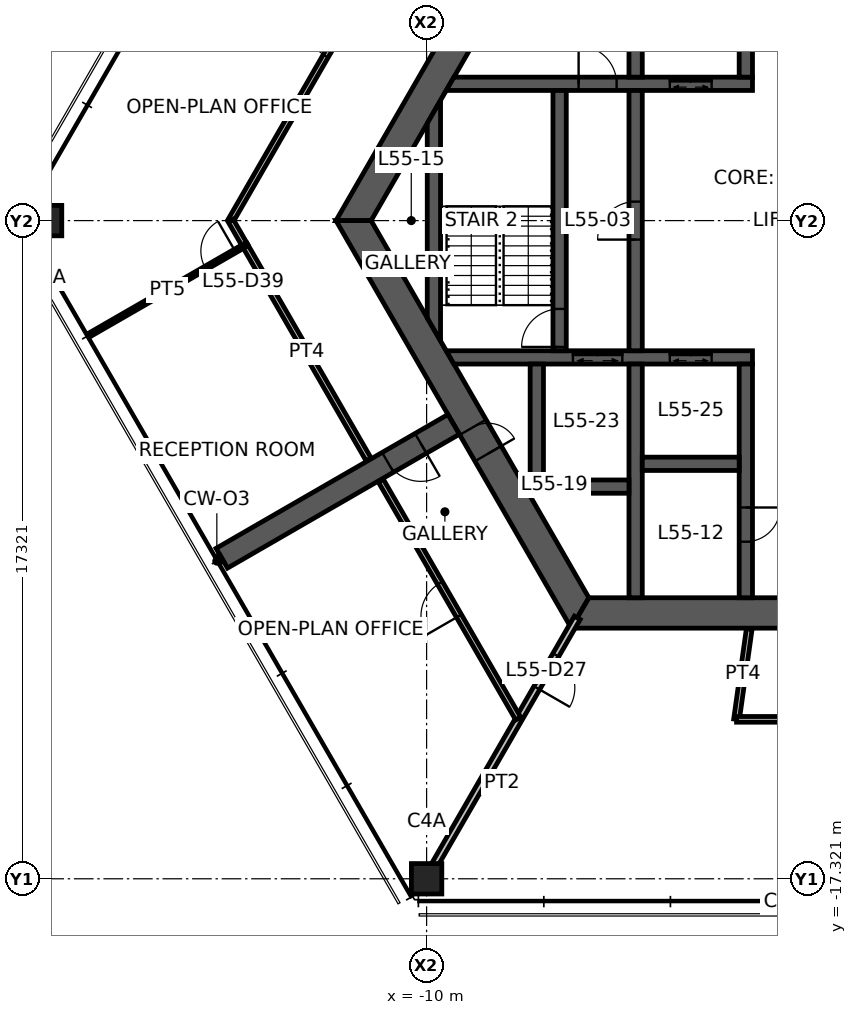
"""IFC4 building model, lengths in metres.
Left out: names, types, materials, properties, quantities, classifications, styles, units other than length and angle.
Written with IfcOpenShell. Run it as: python <this file> out.ifc"""

import sys

from ifc_helpers import new_model, si_unit, direction, frame, frame_2d, origin, origin_2d, place, context, subcontext, project, spatial, polyline, rectangle, hollow_rectangle, outline, extrude, element, fill, save


model = new_model("IFC4")
c1 = context("Model", 3, precision=1e-05, world=origin(), true_north=direction((0.0, 1.0)))
c2 = subcontext(c1, "Body", "Model", "MODEL_VIEW")
j1 = project(units=[si_unit("LENGTHUNIT", "METRE"), si_unit("PLANEANGLEUNIT", "RADIAN")], contexts=[c1])
p1 = place(None, origin())
s1 = spatial("IfcSite", under=j1, at=p1, CompositionType="ELEMENT")
p2 = place(p1, origin())
s2 = spatial("IfcBuilding", under=s1, at=p2, CompositionType="ELEMENT")
p3 = place(p2, frame((0.0, 0.0, 220.6)))
s3 = spatial("IfcBuildingStorey", under=s2, at=p3, CompositionType="ELEMENT", Elevation=220.6)
for number, where, z_axis, x_axis in (
    (1, (-20.0, 0.0, 0.0), (0.0, 0.0, 1.0), (1.0, 0.0, 0.0)),
    (2, (-10.0, -17.321, 0.0), (0.0, 0.0, 1.0), (1.0, 0.0, 0.0)),
):
    element("IfcColumn", number, at=place(p3, frame(where, z_axis=z_axis, x_axis=x_axis)), inside=s3, PredefinedType="COLUMN", context=c2, shape_type="SweptSolid", body=[
        extrude(hollow_rectangle(XDim=0.8, YDim=0.8, WallThickness=0.04, at=origin_2d()), origin(), (0.0, 0.0, 1.0), 3.9),
    ])
p4 = place(p3, frame((-5.961, 10.325, 0.0), z_axis=(0.0, 0.0, 1.0), x_axis=(-0.500004296715, -0.866022923061, 0.0)))
e3 = element("IfcWall", 3, at=p4, inside=s3, PredefinedType="SHEAR", context=c2, shape_type="SweptSolid", body=[
    extrude(outline(polyline([(-0.231, -0.4), (4.494, -0.4), (5.494, -0.4), (12.153, -0.4), (11.691, 0.4), (5.494, 0.4), (4.494, 0.4), (0.231, 0.4), (-0.231, -0.4)])), origin(), (0.0, 0.0, 1.0), 3.9),
])
p5 = place(p4, frame((4.494, 0.0, 0.0)))
e4 = element("IfcOpeningElement", 4, at=p5, cuts=e3, PredefinedType="OPENING", context=c2, shape_type="SweptSolid", body=[
    extrude(rectangle(XDim=1.0, YDim=2.1, at=frame_2d((0.5, 1.05))), frame((0.0, 0.41, 0.0), z_axis=(0.0, -1.0, 0.0), x_axis=(1.0, 0.0, 0.0)), (0.0, 0.0, 1.0), 0.82),
])
p6 = place(p3, frame((-11.922, 0.0, 0.0), z_axis=(0.0, 0.0, 1.0), x_axis=(0.500004296715, -0.866022923061, 0.0)))
e5 = element("IfcWall", 5, at=p6, inside=s3, PredefinedType="SHEAR", context=c2, shape_type="SweptSolid", body=[
    extrude(outline(polyline([(-0.231, -0.4), (6.281, -0.4), (7.081, -0.4), (12.153, -0.4), (11.691, 0.4), (7.081, 0.4), (6.281, 0.4), (0.231, 0.4), (-0.231, -0.4)])), origin(), (0.0, 0.0, 1.0), 3.9),
])
p7 = place(p6, frame((6.281, 0.0, 0.0)))
e6 = element("IfcOpeningElement", 6, at=p7, cuts=e5, PredefinedType="OPENING", context=c2, shape_type="SweptSolid", body=[
    extrude(rectangle(XDim=0.8, YDim=2.1, at=frame_2d((0.4, 1.05))), frame((0.0, 0.41, 0.0), z_axis=(0.0, -1.0, 0.0), x_axis=(1.0, 0.0, 0.0)), (0.0, 0.0, 1.0), 0.82),
])
p8 = place(p3, frame((-5.961, -10.325, 0.0), z_axis=(0.0, 0.0, 1.0), x_axis=(1.0, 0.0, 0.0)))
e7 = element("IfcWall", 7, at=p8, inside=s3, PredefinedType="SHEAR", context=c2, shape_type="SweptSolid", body=[
    extrude(outline(polyline([(-0.231, -0.4), (5.461, -0.4), (6.461, -0.4), (12.153, -0.4), (11.691, 0.4), (6.461, 0.4), (5.461, 0.4), (0.231, 0.4), (-0.231, -0.4)])), origin(), (0.0, 0.0, 1.0), 3.9),
])
p9 = place(p8, frame((5.461, 0.0, 0.0)))
e8 = element("IfcOpeningElement", 8, at=p9, cuts=e7, PredefinedType="OPENING", context=c2, shape_type="SweptSolid", body=[
    extrude(rectangle(XDim=1.0, YDim=2.1, at=frame_2d((0.5, 1.05))), frame((0.0, 0.41, 0.0), z_axis=(0.0, -1.0, 0.0), x_axis=(1.0, 0.0, 0.0)), (0.0, 0.0, 1.0), 0.82),
])
p10 = place(p3, frame((-9.288, -5.363, 0.0), z_axis=(0.0, 0.0, 1.0), x_axis=(-0.866027473358, -0.499996415376, 0.0)))
e9 = element("IfcWall", 9, at=p10, inside=s3, PredefinedType="SHEAR", context=c2, shape_type="SweptSolid", body=[
    extrude(rectangle(XDim=7.045, YDim=0.6, at=frame_2d((3.523, 0.0))), origin(), (0.0, 0.0, 1.0), 3.9),
])
p11 = place(p10, frame((1.0, 0.0, 0.0)))
e10 = element("IfcOpeningElement", 10, at=p11, cuts=e9, PredefinedType="OPENING", context=c2, shape_type="SweptSolid", body=[
    extrude(rectangle(XDim=1.0, YDim=2.1, at=frame_2d((0.5, 1.05))), frame((0.0, 0.31, 0.0), z_axis=(0.0, -1.0, 0.0), x_axis=(1.0, 0.0, 0.0)), (0.0, 0.0, 1.0), 0.62),
])
p12 = place(p3, frame((-9.382, 3.6, 0.0), z_axis=(0.0, 0.0, 1.0), x_axis=(1.0, 0.0, 0.0)))
e11 = element("IfcWall", 11, at=p12, inside=s3, PredefinedType="SHEAR", context=c2, shape_type="SweptSolid", body=[
    extrude(outline(polyline([(-0.101, -0.175), (3.382, -0.175), (4.382, -0.175), (5.782, -0.175), (6.882, -0.175), (7.957, -0.175), (7.957, 0.175), (6.882, 0.175), (5.782, 0.175), (4.382, 0.175), (3.382, 0.175), (0.101, 0.175), (-0.101, -0.175)])), origin(), (0.0, 0.0, 1.0), 3.9),
])
p13 = place(p12, frame((3.382, 0.0, 0.0)))
e12 = element("IfcOpeningElement", 12, at=p13, cuts=e11, PredefinedType="OPENING", context=c2, shape_type="SweptSolid", body=[
    extrude(rectangle(XDim=1.0, YDim=2.1, at=frame_2d((0.5, 1.05))), frame((0.0, 0.185, 0.0), z_axis=(0.0, -1.0, 0.0), x_axis=(1.0, 0.0, 0.0)), (0.0, 0.0, 1.0), 0.37),
])
p14 = place(p12, frame((5.782, 0.0, 0.0)))
e13 = element("IfcOpeningElement", 13, at=p14, cuts=e11, PredefinedType="OPENING", context=c2, shape_type="SweptSolid", body=[
    extrude(rectangle(XDim=1.1, YDim=2.1, at=frame_2d((0.55, 1.05))), frame((0.0, 0.185, 0.0), z_axis=(0.0, -1.0, 0.0), x_axis=(1.0, 0.0, 0.0)), (0.0, 0.0, 1.0), 0.37),
])
p15 = place(p3, frame((-9.382, -3.6, 0.0), z_axis=(0.0, 0.0, 1.0), x_axis=(1.0, 0.0, 0.0)))
e14 = element("IfcWall", 14, at=p15, inside=s3, PredefinedType="SHEAR", context=c2, shape_type="SweptSolid", body=[
    extrude(outline(polyline([(0.101, -0.175), (3.232, -0.175), (4.532, -0.175), (5.782, -0.175), (6.882, -0.175), (7.957, -0.175), (7.957, 0.175), (6.882, 0.175), (5.782, 0.175), (4.532, 0.175), (3.232, 0.175), (-0.101, 0.175), (0.101, -0.175)])), origin(), (0.0, 0.0, 1.0), 3.9),
])
p16 = place(p15, frame((5.782, 0.0, 0.0)))
e15 = element("IfcOpeningElement", 15, at=p16, cuts=e14, PredefinedType="OPENING", context=c2, shape_type="SweptSolid", body=[
    extrude(rectangle(XDim=1.1, YDim=2.1, at=frame_2d((0.55, 1.05))), frame((0.0, 0.185, 0.0), z_axis=(0.0, -1.0, 0.0), x_axis=(1.0, 0.0, 0.0)), (0.0, 0.0, 1.0), 0.37),
])
p17 = place(p15, frame((3.232, 0.0, 0.0)))
e16 = element("IfcOpeningElement", 16, at=p17, cuts=e14, PredefinedType="OPENING", context=c2, shape_type="SweptSolid", body=[
    extrude(rectangle(XDim=1.3, YDim=2.1, at=frame_2d((0.65, 1.05))), frame((0.0, 0.185, 0.0), z_axis=(0.0, -1.0, 0.0), x_axis=(1.0, 0.0, 0.0)), (0.0, 0.0, 1.0), 0.37),
])
p18 = place(p3, frame((-1.6, 3.775, 0.0), z_axis=(0.0, 0.0, 1.0), x_axis=(0.0, 1.0, 0.0)))
e17 = element("IfcWall", 17, at=p18, inside=s3, PredefinedType="SHEAR", context=c2, shape_type="SweptSolid", body=[
    extrude(rectangle(XDim=6.15, YDim=0.35, at=frame_2d((3.075, 0.0))), origin(), (0.0, 0.0, 1.0), 3.9),
])
p19 = place(p18, frame((3.775, 0.0, 0.0)))
e18 = element("IfcOpeningElement", 18, at=p19, cuts=e17, PredefinedType="OPENING", context=c2, shape_type="SweptSolid", body=[
    extrude(rectangle(XDim=0.9, YDim=2.1, at=frame_2d((0.45, 1.05))), frame((0.0, 0.185, 0.0), z_axis=(0.0, -1.0, 0.0), x_axis=(1.0, 0.0, 0.0)), (0.0, 0.0, 1.0), 0.37),
])
p20 = place(p3, frame((-1.6, -3.775, 0.0), z_axis=(0.0, 0.0, 1.0), x_axis=(0.0, -1.0, 0.0)))
e19 = element("IfcWall", 19, at=p20, inside=s3, PredefinedType="SHEAR", context=c2, shape_type="SweptSolid", body=[
    extrude(rectangle(XDim=6.15, YDim=0.35, at=frame_2d((3.075, 0.0))), origin(), (0.0, 0.0, 1.0), 3.9),
])
p21 = place(p20, frame((3.775, 0.0, 0.0)))
e20 = element("IfcOpeningElement", 20, at=p21, cuts=e19, PredefinedType="OPENING", context=c2, shape_type="SweptSolid", body=[
    extrude(rectangle(XDim=0.9, YDim=2.1, at=frame_2d((0.45, 1.05))), frame((0.0, 0.185, 0.0), z_axis=(0.0, -1.0, 0.0), x_axis=(1.0, 0.0, 0.0)), (0.0, 0.0, 1.0), 0.37),
])
p22 = place(p3, frame((-4.5, -3.425, 0.0), z_axis=(0.0, 0.0, 1.0), x_axis=(0.0, 1.0, 0.0)))
e21 = element("IfcWall", 21, at=p22, inside=s3, PredefinedType="SHEAR", context=c2, shape_type="SweptSolid", body=[
    extrude(rectangle(XDim=6.85, YDim=0.35, at=frame_2d((3.425, 0.0))), origin(), (0.0, 0.0, 1.0), 3.9),
])
p23 = place(p22, frame((2.925, 0.0, 0.0)))
e22 = element("IfcOpeningElement", 22, at=p23, cuts=e21, PredefinedType="OPENING", context=c2, shape_type="SweptSolid", body=[
    extrude(rectangle(XDim=1.0, YDim=2.1, at=frame_2d((0.5, 1.05))), frame((0.0, 0.185, 0.0), z_axis=(0.0, -1.0, 0.0), x_axis=(1.0, 0.0, 0.0)), (0.0, 0.0, 1.0), 0.37),
])
p24 = place(p3, frame((-6.5, -3.425, 0.0), z_axis=(0.0, 0.0, 1.0), x_axis=(0.0, 1.0, 0.0)))
e23 = element("IfcWall", 23, at=p24, inside=s3, PredefinedType="SHEAR", context=c2, shape_type="SweptSolid", body=[
    extrude(rectangle(XDim=6.85, YDim=0.35, at=frame_2d((3.425, 0.0))), origin(), (0.0, 0.0, 1.0), 3.9),
])
p25 = place(p24, frame((0.1, 0.0, 0.0)))
e24 = element("IfcOpeningElement", 24, at=p25, cuts=e23, PredefinedType="OPENING", context=c2, shape_type="SweptSolid", body=[
    extrude(rectangle(XDim=1.0, YDim=2.1, at=frame_2d((0.5, 1.05))), frame((0.0, 0.185, 0.0), z_axis=(0.0, -1.0, 0.0), x_axis=(1.0, 0.0, 0.0)), (0.0, 0.0, 1.0), 0.37),
])
for number, where, z_axis, x_axis in (
    (25, (-4.5, 3.775, 0.0), (0.0, 0.0, 1.0), (0.0, 1.0, 0.0)),
    (26, (-4.5, -3.775, 0.0), (0.0, 0.0, 1.0), (0.0, -1.0, 0.0)),
):
    element("IfcWall", number, at=place(p3, frame(where, z_axis=z_axis, x_axis=x_axis)), inside=s3, PredefinedType="SHEAR", context=c2, shape_type="SweptSolid", body=[
        extrude(rectangle(XDim=6.15, YDim=0.35, at=frame_2d((3.075, 0.0))), origin(), (0.0, 0.0, 1.0), 3.9),
    ])
p26 = place(p3, frame((-4.325, -6.4, 0.0), z_axis=(0.0, 0.0, 1.0), x_axis=(1.0, 0.0, 0.0)))
e27 = element("IfcWall", 27, at=p26, inside=s3, PredefinedType="SHEAR", context=c2, shape_type="SweptSolid", body=[
    extrude(rectangle(XDim=2.55, YDim=0.35, at=frame_2d((1.275, 0.0))), origin(), (0.0, 0.0, 1.0), 3.9),
])
p27 = place(p3, frame((-7.275, -7.0, 0.0), z_axis=(0.0, 0.0, 1.0), x_axis=(1.0, 0.0, 0.0)))
e28 = element("IfcWall", 28, at=p27, inside=s3, PredefinedType="SHEAR", context=c2, shape_type="SweptSolid", body=[
    extrude(rectangle(XDim=2.6, YDim=0.35, at=frame_2d((1.3, 0.0))), origin(), (0.0, 0.0, 1.0), 3.9),
])
p28 = place(p3, frame((-7.1, -3.775, 0.0), z_axis=(0.0, 0.0, 1.0), x_axis=(0.0, -1.0, 0.0)))
e29 = element("IfcWall", 29, at=p28, inside=s3, PredefinedType="SHEAR", context=c2, shape_type="SweptSolid", body=[
    extrude(rectangle(XDim=3.05, YDim=0.35, at=frame_2d((1.525, 0.0))), origin(), (0.0, 0.0, 1.0), 3.9),
])
p29 = place(p3, frame((-9.808, -2.862, 0.0), z_axis=(0.0, 0.0, 1.0), x_axis=(0.0, 1.0, 0.0)))
e30 = element("IfcWall", 30, at=p29, inside=s3, PredefinedType="SHEAR", context=c2, shape_type="SweptSolid", body=[
    extrude(outline(polyline([(-0.303, -0.175), (6.028, -0.175), (5.421, 0.175), (0.303, 0.175), (-0.303, -0.175)])), origin(), (0.0, 0.0, 1.0), 3.9),
])
p30 = place(p3, frame((-6.035, -10.453, 0.0), z_axis=(0.0, 0.0, 1.0), x_axis=(-0.499989830942, -0.866031274813, 0.0)))
e31 = element("IfcWall", 31, at=p30, inside=s3, PredefinedType="PARTITIONING", context=c2, shape_type="SweptSolid", body=[
    extrude(rectangle(XDim=7.93, YDim=0.175, at=frame_2d((3.965, 0.0))), origin(), (0.0, 0.0, 1.0), 3.05),
])
p31 = place(p30, frame((1.13, 0.0, 0.0)))
e32 = element("IfcOpeningElement", 32, at=p31, cuts=e31, PredefinedType="OPENING", context=c2, shape_type="SweptSolid", body=[
    extrude(rectangle(XDim=1.0, YDim=2.1, at=frame_2d((0.5, 1.05))), frame((0.0, 0.098, 0.0), z_axis=(0.0, -1.0, 0.0), x_axis=(1.0, 0.0, 0.0)), (0.0, 0.0, 1.0), 0.195),
])
p32 = place(p3, frame((-11.527, -6.285, 0.0), z_axis=(0.0, 0.0, 1.0), x_axis=(-0.500003537243, 0.866023361547, 0.0)))
e33 = element("IfcWall", 33, at=p32, inside=s3, PredefinedType="PARTITIONING", context=c2, shape_type="SweptSolid", body=[
    extrude(rectangle(XDim=6.516, YDim=0.15, at=frame_2d((3.258, 0.0))), origin(), (0.0, 0.0, 1.0), 2.95),
])
p33 = place(p3, frame((-15.156, 0.0, 0.0), z_axis=(0.0, 0.0, 1.0), x_axis=(0.500006847747, 0.8660214502, 0.0)))
e34 = element("IfcWall", 34, at=p33, inside=s3, PredefinedType="PARTITIONING", context=c2, shape_type="SweptSolid", body=[
    extrude(rectangle(XDim=10.998, YDim=0.15, at=frame_2d((5.499, 0.0))), origin(), (0.0, 0.0, 1.0), 2.95),
])
p34 = place(p33, frame((4.999, 0.0, 0.0)))
e35 = element("IfcOpeningElement", 35, at=p34, cuts=e34, PredefinedType="OPENING", context=c2, shape_type="SweptSolid", body=[
    extrude(rectangle(XDim=1.0, YDim=2.1, at=frame_2d((0.5, 1.05))), frame((0.0, 0.085, 0.0), z_axis=(0.0, -1.0, 0.0), x_axis=(1.0, 0.0, 0.0)), (0.0, 0.0, 1.0), 0.17),
])
p35 = place(p3, frame((-14.78, -0.651, 0.0), z_axis=(0.0, 0.0, 1.0), x_axis=(-0.500088105676, 0.865974529972, 0.0)))
e36 = element("IfcWall", 36, at=p35, inside=s3, PredefinedType="PARTITIONING", context=c2, shape_type="SweptSolid", body=[
    extrude(rectangle(XDim=0.751, YDim=0.15, at=frame_2d((0.375, 0.0))), origin(), (0.0, 0.0, 1.0), 2.95),
])
p36 = place(p3, frame((-18.857, -3.0, 0.0), z_axis=(0.0, 0.0, 1.0), x_axis=(0.866504138439, 0.499169888984, 0.0)))
e37 = element("IfcWall", 37, at=p36, inside=s3, PredefinedType="PARTITIONING", context=c2, shape_type="SweptSolid", body=[
    extrude(rectangle(XDim=4.706, YDim=0.1, at=frame_2d((2.353, 0.0))), origin(), (0.0, 0.0, 1.0), 2.95),
])
p37 = place(p36, frame((3.506, 0.0, 0.0)))
e38 = element("IfcOpeningElement", 38, at=p37, cuts=e37, PredefinedType="OPENING", context=c2, shape_type="SweptSolid", body=[
    extrude(rectangle(XDim=0.9, YDim=2.1, at=frame_2d((0.45, 1.05))), frame((0.0, 0.06, 0.0), z_axis=(0.0, -1.0, 0.0), x_axis=(1.0, 0.0, 0.0)), (0.0, 0.0, 1.0), 0.12),
])
p38 = place(p3, frame((-7.589, -13.105, 0.0), z_axis=(0.0, 0.0, 1.0), x_axis=(-0.499986333712, 0.866033293876, 0.0)))
e39 = element("IfcWall", 39, at=p38, inside=s3, PredefinedType="PARTITIONING", context=c2, shape_type="SweptSolid", body=[
    extrude(rectangle(XDim=7.235, YDim=0.15, at=frame_2d((3.617, 0.0))), origin(), (0.0, 0.0, 1.0), 2.95),
])
p39 = place(p38, frame((3.117, 0.0, 0.0)))
e40 = element("IfcOpeningElement", 40, at=p39, cuts=e39, PredefinedType="OPENING", context=c2, shape_type="SweptSolid", body=[
    extrude(rectangle(XDim=1.0, YDim=2.1, at=frame_2d((0.5, 1.05))), frame((0.0, 0.085, 0.0), z_axis=(0.0, -1.0, 0.0), x_axis=(1.0, 0.0, 0.0)), (0.0, 0.0, 1.0), 0.17),
])
p40 = place(p3, frame((-1.844, -13.125, 0.0), z_axis=(0.0, 0.0, 1.0), x_axis=(0.139173892267, 0.99026795753, 0.0)))
e41 = element("IfcWall", 41, at=p40, inside=s3, PredefinedType="PARTITIONING", context=c2, shape_type="SweptSolid", body=[
    extrude(rectangle(XDim=2.403, YDim=0.15, at=frame_2d((1.202, 0.0))), origin(), (0.0, 0.0, 1.0), 2.95),
])
p41 = place(p3, frame((7.578, -13.125, 0.0), z_axis=(0.0, 0.0, 1.0), x_axis=(-1.0, 0.0, 0.0)))
e42 = element("IfcWall", 42, at=p41, inside=s3, PredefinedType="PARTITIONING", context=c2, shape_type="SweptSolid", body=[
    extrude(rectangle(XDim=9.422, YDim=0.15, at=frame_2d((4.711, 0.0))), origin(), (0.0, 0.0, 1.0), 2.95),
])
p42 = place(p41, frame((4.211, 0.0, 0.0)))
e43 = element("IfcOpeningElement", 43, at=p42, cuts=e42, PredefinedType="OPENING", context=c2, shape_type="SweptSolid", body=[
    extrude(rectangle(XDim=1.0, YDim=2.1, at=frame_2d((0.5, 1.05))), frame((0.0, 0.085, 0.0), z_axis=(0.0, -1.0, 0.0), x_axis=(1.0, 0.0, 0.0)), (0.0, 0.0, 1.0), 0.17),
])
p43 = place(p3, frame((-15.39, -8.885, 0.0), z_axis=(0.0, 0.0, 1.0), x_axis=(-0.866472036435, -0.499225610396, 0.0)))
e44 = element("IfcWall", 44, at=p43, inside=s3, PredefinedType="PARTITIONING", context=c2, shape_type="SweptSolid", body=[
    extrude(rectangle(XDim=0.085, YDim=0.175, at=frame_2d((0.042, 0.0))), origin(), (0.0, 0.0, 1.0), 3.9),
])
p44 = place(p7, origin())
e45 = element("IfcDoor", 45, at=p44, inside=s3, OperationType="SINGLE_SWING_RIGHT", PredefinedType="DOOR", context=c2, shape_type="SweptSolid", body=[
    extrude(rectangle(XDim=0.8, YDim=2.1, at=frame_2d((0.4, 1.05))), frame((0.0, 0.025, 0.0), z_axis=(0.0, -1.0, 0.0), x_axis=(1.0, 0.0, 0.0)), (0.0, 0.0, 1.0), 0.05),
])
fill(e6, e45)
p45 = place(p23, origin())
e46 = element("IfcDoor", 46, at=p45, inside=s3, OperationType="SINGLE_SWING_LEFT", PredefinedType="DOOR", context=c2, shape_type="SweptSolid", body=[
    extrude(rectangle(XDim=1.0, YDim=2.1, at=frame_2d((0.5, 1.05))), frame((0.0, 0.025, 0.0), z_axis=(0.0, -1.0, 0.0), x_axis=(1.0, 0.0, 0.0)), (0.0, 0.0, 1.0), 0.05),
])
fill(e22, e46)
p46 = place(p25, origin())
e47 = element("IfcDoor", 47, at=p46, inside=s3, OperationType="SINGLE_SWING_LEFT", PredefinedType="DOOR", context=c2, shape_type="SweptSolid", body=[
    extrude(rectangle(XDim=1.0, YDim=2.1, at=frame_2d((0.5, 1.05))), frame((0.0, 0.025, 0.0), z_axis=(0.0, -1.0, 0.0), x_axis=(1.0, 0.0, 0.0)), (0.0, 0.0, 1.0), 0.05),
])
fill(e24, e47)
p47 = place(p13, origin())
e48 = element("IfcDoor", 48, at=p47, inside=s3, OperationType="SINGLE_SWING_LEFT", PredefinedType="DOOR", context=c2, shape_type="SweptSolid", body=[
    extrude(rectangle(XDim=1.0, YDim=2.1, at=frame_2d((0.5, 1.05))), frame((0.0, 0.025, 0.0), z_axis=(0.0, -1.0, 0.0), x_axis=(1.0, 0.0, 0.0)), (0.0, 0.0, 1.0), 0.05),
])
fill(e12, e48)
p48 = place(p21, origin())
e49 = element("IfcDoor", 49, at=p48, inside=s3, OperationType="SINGLE_SWING_LEFT", PredefinedType="DOOR", context=c2, shape_type="SweptSolid", body=[
    extrude(rectangle(XDim=0.9, YDim=2.1, at=frame_2d((0.45, 1.05))), frame((0.0, 0.025, 0.0), z_axis=(0.0, -1.0, 0.0), x_axis=(1.0, 0.0, 0.0)), (0.0, 0.0, 1.0), 0.05),
])
fill(e20, e49)
p49 = place(p11, origin())
e50 = element("IfcDoor", 50, at=p49, inside=s3, OperationType="SINGLE_SWING_LEFT", PredefinedType="DOOR", context=c2, shape_type="SweptSolid", body=[
    extrude(rectangle(XDim=1.0, YDim=2.1, at=frame_2d((0.5, 1.05))), frame((0.0, 0.025, 0.0), z_axis=(0.0, -1.0, 0.0), x_axis=(1.0, 0.0, 0.0)), (0.0, 0.0, 1.0), 0.05),
])
fill(e10, e50)
p50 = place(p31, origin())
e51 = element("IfcDoor", 51, at=p50, inside=s3, OperationType="SINGLE_SWING_RIGHT", PredefinedType="DOOR", context=c2, shape_type="SweptSolid", body=[
    extrude(rectangle(XDim=1.0, YDim=2.1, at=frame_2d((0.5, 1.05))), frame((0.0, 0.025, 0.0), z_axis=(0.0, -1.0, 0.0), x_axis=(1.0, 0.0, 0.0)), (0.0, 0.0, 1.0), 0.05),
])
fill(e32, e51)
p51 = place(p34, origin())
e52 = element("IfcDoor", 52, at=p51, inside=s3, OperationType="SINGLE_SWING_RIGHT", PredefinedType="DOOR", context=c2, shape_type="SweptSolid", body=[
    extrude(rectangle(XDim=1.0, YDim=2.1, at=frame_2d((0.5, 1.05))), frame((0.0, 0.025, 0.0), z_axis=(0.0, -1.0, 0.0), x_axis=(1.0, 0.0, 0.0)), (0.0, 0.0, 1.0), 0.05),
])
fill(e35, e52)
p52 = place(p37, origin())
e53 = element("IfcDoor", 53, at=p52, inside=s3, OperationType="SINGLE_SWING_RIGHT", PredefinedType="DOOR", context=c2, shape_type="SweptSolid", body=[
    extrude(rectangle(XDim=0.9, YDim=2.1, at=frame_2d((0.45, 1.05))), frame((0.0, 0.025, 0.0), z_axis=(0.0, -1.0, 0.0), x_axis=(1.0, 0.0, 0.0)), (0.0, 0.0, 1.0), 0.05),
])
fill(e38, e53)
p53 = place(p39, origin())
e54 = element("IfcDoor", 54, at=p53, inside=s3, OperationType="SINGLE_SWING_LEFT", PredefinedType="DOOR", context=c2, shape_type="SweptSolid", body=[
    extrude(rectangle(XDim=1.0, YDim=2.1, at=frame_2d((0.5, 1.05))), frame((0.0, 0.025, 0.0), z_axis=(0.0, -1.0, 0.0), x_axis=(1.0, 0.0, 0.0)), (0.0, 0.0, 1.0), 0.05),
])
fill(e40, e54)
p54 = place(p14, origin())
e55 = element("IfcDoor", 55, at=p54, inside=s3, OperationType="DOUBLE_DOOR_SLIDING", PredefinedType="DOOR", context=c2, shape_type="SweptSolid", body=[
    extrude(rectangle(XDim=1.1, YDim=2.1, at=frame_2d((0.55, 1.05))), frame((0.0, 0.025, 0.0), z_axis=(0.0, -1.0, 0.0), x_axis=(1.0, 0.0, 0.0)), (0.0, 0.0, 1.0), 0.05),
])
fill(e13, e55)
p55 = place(p16, origin())
e56 = element("IfcDoor", 56, at=p55, inside=s3, OperationType="DOUBLE_DOOR_SLIDING", PredefinedType="DOOR", context=c2, shape_type="SweptSolid", body=[
    extrude(rectangle(XDim=1.1, YDim=2.1, at=frame_2d((0.55, 1.05))), frame((0.0, 0.025, 0.0), z_axis=(0.0, -1.0, 0.0), x_axis=(1.0, 0.0, 0.0)), (0.0, 0.0, 1.0), 0.05),
])
fill(e15, e56)
p56 = place(p17, origin())
e57 = element("IfcDoor", 57, at=p56, inside=s3, OperationType="DOUBLE_DOOR_SLIDING", PredefinedType="DOOR", context=c2, shape_type="SweptSolid", body=[
    extrude(rectangle(XDim=1.3, YDim=2.1, at=frame_2d((0.65, 1.05))), frame((0.0, 0.025, 0.0), z_axis=(0.0, -1.0, 0.0), x_axis=(1.0, 0.0, 0.0)), (0.0, 0.0, 1.0), 0.05),
])
fill(e16, e57)
save(model, sys.argv[1])
